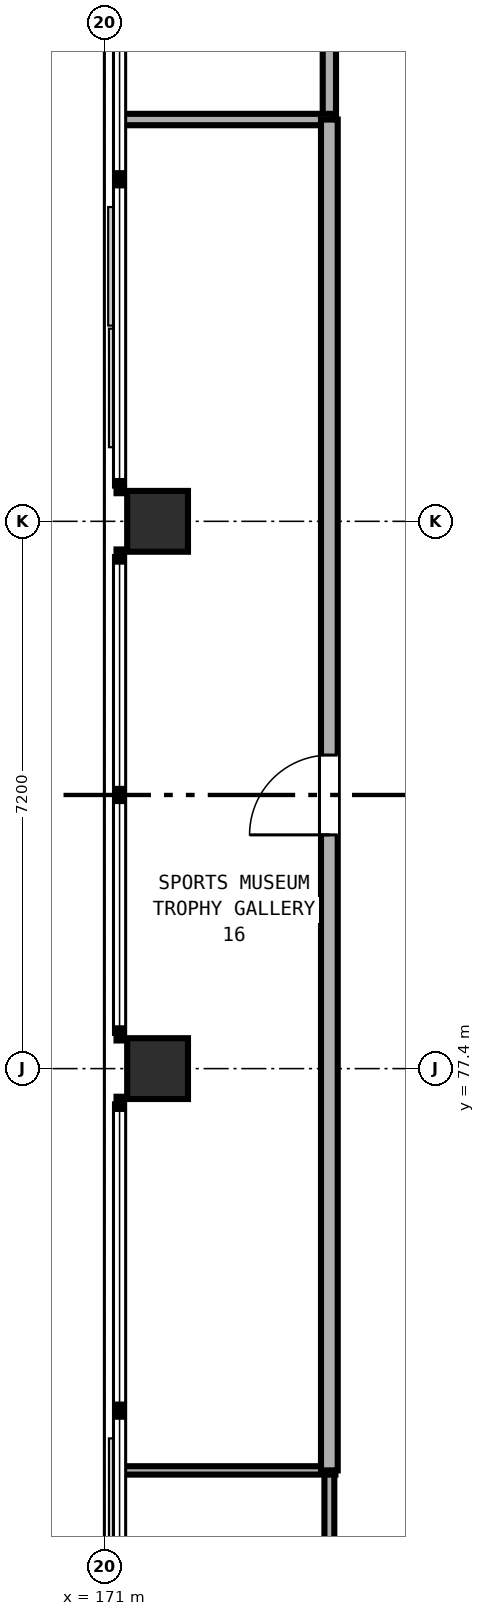
"""IFC4 building model, lengths in metres.
Left out: names, types, materials, properties, quantities, classifications, styles, units other than length and angle.
Written with IfcOpenShell. Run it as: python <this file> out.ifc"""

import sys

from ifc_helpers import new_model, si_unit, direction, frame, frame_2d, origin, origin_2d, place, context, subcontext, project, spatial, rectangle, extrude, element, fill, save


model = new_model("IFC4")
c1 = context("Model", 3, precision=1e-05, world=origin(), true_north=direction((0.0, 1.0)))
c2 = subcontext(c1, "Body", "Model", "MODEL_VIEW")
j1 = project(units=[si_unit("LENGTHUNIT", "METRE"), si_unit("PLANEANGLEUNIT", "RADIAN")], contexts=[c1])
p1 = place(None, origin())
s1 = spatial("IfcSite", under=j1, at=p1, CompositionType="ELEMENT")
p2 = place(p1, origin())
s2 = spatial("IfcBuilding", under=s1, at=p2, CompositionType="ELEMENT")
p3 = place(p2, frame((0.0, 0.0, 9.6)))
s3 = spatial("IfcBuildingStorey", under=s2, at=p3, CompositionType="ELEMENT", Elevation=9.6)
for number, where, z_axis, x_axis in (
    (1, (171.7, 77.4, 0.0), (0.0, 0.0, 1.0), (1.0, 0.0, 0.0)),
    (2, (171.7, 84.6, 0.0), (0.0, 0.0, 1.0), (1.0, 0.0, 0.0)),
):
    element("IfcColumn", number, at=place(p3, frame(where, z_axis=z_axis, x_axis=x_axis)), inside=s3, PredefinedType="COLUMN", context=c2, shape_type="SweptSolid", body=[
        extrude(rectangle(XDim=0.8, YDim=0.8, at=origin_2d()), origin(), (0.0, 0.0, 1.0), 4.8),
    ])
p4 = place(p3, frame((173.96, 89.886, 0.0), z_axis=(0.0, 0.0, 1.0), x_axis=(0.0, 1.0, 0.0)))
e3 = element("IfcWall", 3, at=p4, inside=s3, PredefinedType="PARTITIONING", context=c2, shape_type="SweptSolid", body=[
    extrude(rectangle(XDim=17.772, YDim=0.175, at=frame_2d((8.886, 0.0))), origin(), (0.0, 0.0, 1.0), 3.56),
])
p5 = place(p4, frame((7.259, 0.0, 0.0)))
e4 = element("IfcOpeningElement", 4, at=p5, cuts=e3, PredefinedType="OPENING", context=c2, shape_type="SweptSolid", body=[
    extrude(rectangle(XDim=1.15, YDim=2.15, at=frame_2d((0.575, 1.075))), frame((0.0, 0.097, 0.0), z_axis=(0.0, -1.0, 0.0), x_axis=(1.0, 0.0, 0.0)), (0.0, 0.0, 1.0), 0.195),
])
p6 = place(p3, frame((174.04, 89.886, 0.0), z_axis=(0.0, 0.0, 1.0), x_axis=(-1.0, 0.0, 0.0)))
e5 = element("IfcWall", 5, at=p6, inside=s3, PredefinedType="PARTITIONING", context=c2, shape_type="SweptSolid", body=[
    extrude(rectangle(XDim=2.807, YDim=0.15, at=frame_2d((1.404, 0.0))), origin(), (0.0, 0.0, 1.0), 3.56),
])
p7 = place(p3, frame((173.96, 54.342, 0.0), z_axis=(0.0, 0.0, 1.0), x_axis=(0.0, 1.0, 0.0)))
e6 = element("IfcWall", 6, at=p7, inside=s3, PredefinedType="PARTITIONING", context=c2, shape_type="SweptSolid", body=[
    extrude(rectangle(XDim=17.772, YDim=0.13, at=frame_2d((8.886, 0.0))), origin(), (0.0, 0.0, 1.0), 3.56),
])
p8 = place(p7, frame((9.388, 0.0, 0.0)))
e7 = element("IfcOpeningElement", 7, at=p8, cuts=e6, PredefinedType="OPENING", context=c2, shape_type="SweptSolid", body=[
    extrude(rectangle(XDim=1.1, YDim=2.1, at=frame_2d((0.55, 1.05))), frame((0.0, 0.075, 0.0), z_axis=(0.0, -1.0, 0.0), x_axis=(1.0, 0.0, 0.0)), (0.0, 0.0, 1.0), 0.15),
])
p9 = place(p3, frame((171.233, 72.114, 0.0), z_axis=(0.0, 0.0, 1.0), x_axis=(1.0, 0.0, 0.0)))
e8 = element("IfcWall", 8, at=p9, inside=s3, PredefinedType="PARTITIONING", context=c2, shape_type="SweptSolid", body=[
    extrude(rectangle(XDim=2.807, YDim=0.11, at=frame_2d((1.404, 0.0))), origin(), (0.0, 0.0, 1.0), 3.56),
])
p10 = place(p3, frame((173.96, 72.114, 0.0), z_axis=(0.0, 0.0, 1.0), x_axis=(0.0, 1.0, 0.0)))
e9 = element("IfcWall", 9, at=p10, inside=s3, PredefinedType="PARTITIONING", context=c2, shape_type="SweptSolid", body=[
    extrude(rectangle(XDim=17.772, YDim=0.22, at=frame_2d((8.886, 0.0))), origin(), (0.0, 0.0, 1.0), 3.56),
])
p11 = place(p10, frame((8.361, 0.0, 0.0)))
e10 = element("IfcOpeningElement", 10, at=p11, cuts=e9, PredefinedType="OPENING", context=c2, shape_type="SweptSolid", body=[
    extrude(rectangle(XDim=1.05, YDim=2.1, at=frame_2d((0.525, 1.05))), frame((0.0, 0.12, 0.0), z_axis=(0.0, -1.0, 0.0), x_axis=(1.0, 0.0, 0.0)), (0.0, 0.0, 1.0), 0.24),
])
p12 = place(p11, origin())
e11 = element("IfcDoor", 11, at=p12, inside=s3, OperationType="SINGLE_SWING_LEFT", PredefinedType="DOOR", context=c2, shape_type="SweptSolid", body=[
    extrude(rectangle(XDim=1.05, YDim=2.1, at=frame_2d((0.525, 1.05))), frame((0.0, 0.025, 0.0), z_axis=(0.0, -1.0, 0.0), x_axis=(1.0, 0.0, 0.0)), (0.0, 0.0, 1.0), 0.05),
])
fill(e10, e11)
save(model, sys.argv[1])
